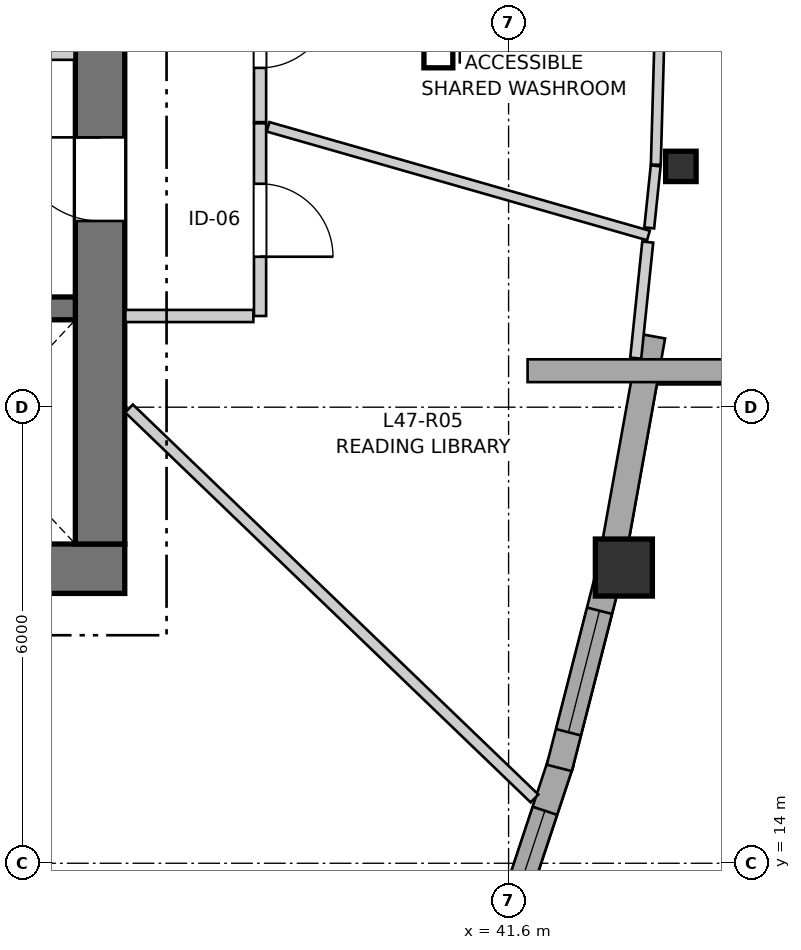
"""IFC4 building model, lengths in metres.
Left out: names, types, materials, properties, quantities, classifications, styles, units other than length and angle.
Written with IfcOpenShell. Run it as: python <this file> out.ifc"""

import sys

from ifc_helpers import new_model, si_unit, direction, frame, frame_2d, origin, origin_2d, place, context, subcontext, project, spatial, rectangle, i_section, extrude, source, transform, mapped, element, fill, save


model = new_model("IFC4")
c1 = context("Model", 3, precision=1e-05, world=origin(), true_north=direction((0.0, 1.0)))
c2 = subcontext(c1, "Body", "Model", "MODEL_VIEW")
j1 = project(units=[si_unit("LENGTHUNIT", "METRE"), si_unit("PLANEANGLEUNIT", "RADIAN")], contexts=[c1])
p1 = place(None, origin())
s1 = spatial("IfcSite", under=j1, at=p1, CompositionType="ELEMENT")
p2 = place(p1, origin())
s2 = spatial("IfcBuilding", under=s1, at=p2, CompositionType="ELEMENT")
p3 = place(p2, frame((0.0, 0.0, 158.6)))
s3 = spatial("IfcBuildingStorey", under=s2, at=p3, CompositionType="ELEMENT", Elevation=158.6)
p4 = place(p3, frame((24.15, 17.875, 0.0), z_axis=(0.0, 0.0, 1.0), x_axis=(1.0, 0.0, 0.0)))
e1 = element("IfcWall", 1, at=p4, inside=s3, PredefinedType="SHEAR", context=c2, shape_type="SweptSolid", body=[
    extrude(rectangle(XDim=12.4, YDim=0.65, at=frame_2d((6.2, 0.0))), origin(), (0.0, 0.0, 1.0), 2.95),
])
p5 = place(p3, frame((36.225, 18.2, 0.0), z_axis=(0.0, 0.0, 1.0), x_axis=(0.0, 1.0, 0.0)))
e2 = element("IfcWall", 2, at=p5, inside=s3, PredefinedType="SHEAR", context=c2, shape_type="SweptSolid", body=[
    extrude(rectangle(XDim=15.6, YDim=0.65, at=frame_2d((7.8, 0.0))), origin(), (0.0, 0.0, 1.0), 2.95),
])
p6 = place(p5, frame((4.25, 0.0, 0.0)))
e3 = element("IfcOpeningElement", 3, at=p6, cuts=e2, PredefinedType="OPENING", context=c2, shape_type="SweptSolid", body=[
    extrude(rectangle(XDim=1.1, YDim=2.15, at=frame_2d((0.55, 1.075))), frame((0.0, 0.335, 0.0), z_axis=(0.0, -1.0, 0.0), x_axis=(1.0, 0.0, 0.0)), (0.0, 0.0, 1.0), 0.67),
])
p7 = place(p5, frame((10.25, 0.0, 0.0)))
e4 = element("IfcOpeningElement", 4, at=p7, cuts=e2, PredefinedType="OPENING", context=c2, shape_type="SweptSolid", body=[
    extrude(rectangle(XDim=1.1, YDim=2.15, at=frame_2d((0.55, 1.075))), frame((0.0, 0.335, 0.0), z_axis=(0.0, -1.0, 0.0), x_axis=(1.0, 0.0, 0.0)), (0.0, 0.0, 1.0), 0.67),
])
p8 = place(p3, frame((24.8, 21.3, 0.0), z_axis=(0.0, 0.0, 1.0), x_axis=(1.0, 0.0, 0.0)))
e5 = element("IfcWall", 5, at=p8, inside=s3, PredefinedType="SHEAR", context=c2, shape_type="SweptSolid", body=[
    extrude(rectangle(XDim=11.1, YDim=0.3, at=frame_2d((5.55, 0.0))), origin(), (0.0, 0.0, 1.0), 2.95),
])
p9 = place(p8, frame((6.22, 0.0, 0.0)))
e6 = element("IfcOpeningElement", 6, at=p9, cuts=e5, PredefinedType="OPENING", context=c2, shape_type="SweptSolid", body=[
    extrude(rectangle(XDim=0.98, YDim=2.15, at=frame_2d((0.49, 1.075))), frame((0.0, 0.16, 0.0), z_axis=(0.0, -1.0, 0.0), x_axis=(1.0, 0.0, 0.0)), (0.0, 0.0, 1.0), 0.32),
])
p10 = place(p8, frame((9.15, 0.0, 0.0)))
e7 = element("IfcOpeningElement", 7, at=p10, cuts=e5, PredefinedType="OPENING", context=c2, shape_type="SweptSolid", body=[
    extrude(rectangle(XDim=1.15, YDim=2.15, at=frame_2d((0.575, 1.075))), frame((0.0, 0.16, 0.0), z_axis=(0.0, -1.0, 0.0), x_axis=(1.0, 0.0, 0.0)), (0.0, 0.0, 1.0), 0.32),
])
m1 = source(origin(), c2, "Body", "SweptSolid", [
    extrude(rectangle(XDim=0.75, YDim=0.75, at=origin_2d()), origin(), (0.0, 0.0, 1.0), 2.95),
])
p11 = place(p3, frame((43.117, 17.89, 0.0), z_axis=(0.0, 0.0, 1.0), x_axis=(1.0, 0.0, 0.0)))
e8 = element("IfcColumn", 8, at=p11, inside=s3, PredefinedType="COLUMN", context=c2, shape_type="MappedRepresentation", body=[
    mapped(m1, transform((0.0, 0.0, 0.0), x_axis=(1.0, 0.0, 0.0), y_axis=(0.0, 1.0, 0.0), z_axis=(0.0, 0.0, 1.0), scale=1.0)),
])
m2 = source(origin(), c2, "Body", "SweptSolid", [
    extrude(i_section(OverallWidth=0.401, OverallDepth=0.399, WebThickness=0.023, FlangeThickness=0.036, FilletRadius=0.015, at=origin_2d()), origin(), (0.0, 0.0, 1.0), 2.95),
])
p12 = place(p3, frame((43.867, 23.168, 0.0), z_axis=(0.0, 0.0, 1.0), x_axis=(1.0, 0.0, 0.0)))
e9 = element("IfcColumn", 9, at=p12, inside=s3, PredefinedType="PILASTER", context=c2, shape_type="MappedRepresentation", body=[
    mapped(m2, transform((0.0, 0.0, 0.0), x_axis=(1.0, 0.0, 0.0), y_axis=(0.0, 1.0, 0.0), z_axis=(0.0, 0.0, 1.0), scale=1.0)),
])
p13 = place(p3, frame((41.411, 12.677, 0.0), z_axis=(0.0, 0.0, 1.0), x_axis=(0.31445026244, 0.949273950159, 0.0)))
e10 = element("IfcWall", 10, at=p13, inside=s3, PredefinedType="SOLIDWALL", context=c2, shape_type="SweptSolid", body=[
    extrude(rectangle(XDim=2.803, YDim=0.34, at=frame_2d((1.401, 0.0))), origin(), (0.0, 0.0, 1.0), 2.53),
])
p14 = place(p13, frame((0.321, 0.0, 0.82)))
e11 = element("IfcOpeningElement", 11, at=p14, cuts=e10, PredefinedType="OPENING", context=c2, shape_type="SweptSolid", body=[
    extrude(rectangle(XDim=1.8, YDim=1.45, at=frame_2d((0.9, 0.725))), frame((0.0, 0.18, 0.0), z_axis=(0.0, -1.0, 0.0), x_axis=(1.0, 0.0, 0.0)), (0.0, 0.0, 1.0), 0.36),
])
p15 = place(p3, frame((42.267, 15.254, 0.0), z_axis=(0.0, 0.0, 1.0), x_axis=(0.247727064013, 0.96882986213, 0.0)))
e12 = element("IfcWall", 12, at=p15, inside=s3, PredefinedType="SOLIDWALL", context=c2, shape_type="SweptSolid", body=[
    extrude(rectangle(XDim=2.61, YDim=0.34, at=frame_2d((1.305, 0.0))), origin(), (0.0, 0.0, 1.0), 2.53),
])
p16 = place(p15, frame((0.485, 0.0, 0.82)))
e13 = element("IfcOpeningElement", 13, at=p16, cuts=e12, PredefinedType="OPENING", context=c2, shape_type="SweptSolid", body=[
    extrude(rectangle(XDim=1.65, YDim=1.45, at=frame_2d((0.825, 0.725))), frame((0.0, 0.18, 0.0), z_axis=(0.0, -1.0, 0.0), x_axis=(1.0, 0.0, 0.0)), (0.0, 0.0, 1.0), 0.36),
])
p17 = place(p3, frame((42.977, 18.073, 0.0), z_axis=(0.0, 0.0, 1.0), x_axis=(0.177185533742, 0.984177467042, 0.0)))
e14 = element("IfcWall", 14, at=p17, inside=s3, PredefinedType="SOLIDWALL", context=c2, shape_type="SweptSolid", body=[
    extrude(rectangle(XDim=2.907, YDim=0.34, at=frame_2d((1.454, 0.0))), origin(), (0.0, 0.0, 1.0), 2.53),
])
p18 = place(p3, frame((41.85, 20.48, 0.0), z_axis=(0.0, 0.0, 1.0), x_axis=(1.0, 0.0, 0.0)))
e15 = element("IfcWall", 15, at=p18, inside=s3, PredefinedType="SOLIDWALL", context=c2, shape_type="SweptSolid", body=[
    extrude(rectangle(XDim=17.423, YDim=0.3, at=frame_2d((8.711, 0.0))), origin(), (0.0, 0.0, 1.0), 2.13),
])
p19 = place(p3, frame((30.67, 24.66, 0.0), z_axis=(0.0, 0.0, 1.0), x_axis=(1.0, 0.0, 0.0)))
e16 = element("IfcWall", 16, at=p19, inside=s3, PredefinedType="PARTITIONING", context=c2, shape_type="SweptSolid", body=[
    extrude(rectangle(XDim=5.22, YDim=0.18, at=frame_2d((2.61, 0.0))), origin(), (0.0, 0.0, 1.0), 2.95),
])
p20 = place(p19, frame((0.68, 0.0, 0.0)))
e17 = element("IfcOpeningElement", 17, at=p20, cuts=e16, PredefinedType="OPENING", context=c2, shape_type="SweptSolid", body=[
    extrude(rectangle(XDim=0.98, YDim=2.15, at=frame_2d((0.49, 1.075))), frame((0.0, 0.1, 0.0), z_axis=(0.0, -1.0, 0.0), x_axis=(1.0, 0.0, 0.0)), (0.0, 0.0, 1.0), 0.2),
])
p21 = place(p3, frame((38.33, 23.735, 0.0), z_axis=(0.0, 0.0, 1.0), x_axis=(0.0, -1.0, 0.0)))
e18 = element("IfcWall", 18, at=p21, inside=s3, PredefinedType="PARTITIONING", context=c2, shape_type="SweptSolid", body=[
    extrude(rectangle(XDim=2.535, YDim=0.16, at=frame_2d((1.268, 0.0))), origin(), (0.0, 0.0, 1.0), 2.95),
])
p22 = place(p21, frame((0.795, 0.0, 0.0)))
e19 = element("IfcOpeningElement", 19, at=p22, cuts=e18, PredefinedType="OPENING", context=c2, shape_type="SweptSolid", body=[
    extrude(rectangle(XDim=0.96, YDim=2.1, at=frame_2d((0.48, 1.05))), frame((0.0, 0.09, 0.0), z_axis=(0.0, -1.0, 0.0), x_axis=(1.0, 0.0, 0.0)), (0.0, 0.0, 1.0), 0.18),
])
p23 = place(p3, frame((38.33, 26.129, 0.0), z_axis=(0.0, 0.0, 1.0), x_axis=(0.0, -1.0, 0.0)))
e20 = element("IfcWall", 20, at=p23, inside=s3, PredefinedType="PARTITIONING", context=c2, shape_type="SweptSolid", body=[
    extrude(rectangle(XDim=2.379, YDim=0.16, at=frame_2d((1.189, 0.0))), origin(), (0.0, 0.0, 1.0), 2.95),
])
p24 = place(p23, frame((0.715, 0.0, 0.0)))
e21 = element("IfcOpeningElement", 21, at=p24, cuts=e20, PredefinedType="OPENING", context=c2, shape_type="SweptSolid", body=[
    extrude(rectangle(XDim=0.95, YDim=2.1, at=frame_2d((0.475, 1.05))), frame((0.0, 0.09, 0.0), z_axis=(0.0, -1.0, 0.0), x_axis=(1.0, 0.0, 0.0)), (0.0, 0.0, 1.0), 0.18),
])
p25 = place(p3, frame((36.606, 19.983, 0.0), z_axis=(0.0, 0.0, 1.0), x_axis=(0.720776649136, -0.69316738387, 0.0)))
e22 = element("IfcWall", 22, at=p25, inside=s3, PredefinedType="PARTITIONING", context=c2, shape_type="SweptSolid", body=[
    extrude(rectangle(XDim=7.401, YDim=0.145, at=frame_2d((3.701, 0.0))), origin(), (0.0, 0.0, 1.0), 2.95),
])
p26 = place(p3, frame((38.436, 23.689, 0.0), z_axis=(0.0, 0.0, 1.0), x_axis=(0.961531027854, -0.274696345942, 0.0)))
e23 = element("IfcWall", 23, at=p26, inside=s3, PredefinedType="PARTITIONING", context=c2, shape_type="SweptSolid", body=[
    extrude(rectangle(XDim=5.205, YDim=0.13, at=frame_2d((2.602, 0.0))), origin(), (0.0, 0.0, 1.0), 2.95),
])
p27 = place(p3, frame((43.537, 23.19, 0.0), z_axis=(0.0, 0.0, 1.0), x_axis=(0.028319632762, 0.999598918767, 0.0)))
e24 = element("IfcWall", 24, at=p27, inside=s3, PredefinedType="PARTITIONING", context=c2, shape_type="SweptSolid", body=[
    extrude(rectangle(XDim=2.612, YDim=0.13, at=frame_2d((1.306, 0.0))), origin(), (0.0, 0.0, 1.0), 2.518),
])
p28 = place(p3, frame((36.558, 21.2, 0.0), z_axis=(0.0, 0.0, 1.0), x_axis=(1.0, 0.0, 0.0)))
e25 = element("IfcWall", 25, at=p28, inside=s3, PredefinedType="PARTITIONING", context=c2, shape_type="SweptSolid", body=[
    extrude(rectangle(XDim=1.684, YDim=0.16, at=frame_2d((0.842, 0.0))), origin(), (0.0, 0.0, 1.0), 2.95),
])
p29 = place(p3, frame((43.273, 20.646, 0.0), z_axis=(0.0, 0.0, 1.0), x_axis=(0.103045636414, 0.99467662927, 0.0)))
e26 = element("IfcWall", 26, at=p29, inside=s3, PredefinedType="PARTITIONING", context=c2, shape_type="SweptSolid", body=[
    extrude(rectangle(XDim=1.535, YDim=0.145, at=frame_2d((0.768, 0.0))), origin(), (0.0, 0.0, 1.0), 2.518),
])
p30 = place(p3, frame((43.45, 22.359, 0.0), z_axis=(0.0, 0.0, 1.0), x_axis=(0.103538633142, 0.994625432737, 0.0)))
e27 = element("IfcWall", 27, at=p30, inside=s3, PredefinedType="PARTITIONING", context=c2, shape_type="SweptSolid", body=[
    extrude(rectangle(XDim=0.821, YDim=0.13, at=frame_2d((0.41, 0.0))), origin(), (0.0, 0.0, 1.0), 2.518),
])
m3 = source(origin(), c2, "Body", "SweptSolid", [
    extrude(rectangle(XDim=1.8, YDim=1.45, at=frame_2d((0.9, 0.725))), frame((0.0, 0.03, 0.0), z_axis=(0.0, -1.0, 0.0), x_axis=(1.0, 0.0, 0.0)), (0.0, 0.0, 1.0), 0.06),
])
p31 = place(p14, origin())
e28 = element("IfcWindow", 28, at=p31, inside=s3, PartitioningType="SINGLE_PANEL", PredefinedType="WINDOW", context=c2, shape_type="MappedRepresentation", body=[
    mapped(m3, transform((0.0, 0.0, 0.0), x_axis=(1.0, 0.0, 0.0), y_axis=(0.0, 1.0, 0.0), z_axis=(0.0, 0.0, 1.0), scale=1.0)),
])
fill(e11, e28)
m4 = source(origin(), c2, "Body", "SweptSolid", [
    extrude(rectangle(XDim=1.65, YDim=1.45, at=frame_2d((0.825, 0.725))), frame((0.0, 0.03, 0.0), z_axis=(0.0, -1.0, 0.0), x_axis=(1.0, 0.0, 0.0)), (0.0, 0.0, 1.0), 0.06),
])
p32 = place(p16, origin())
e29 = element("IfcWindow", 29, at=p32, inside=s3, PartitioningType="SINGLE_PANEL", PredefinedType="WINDOW", context=c2, shape_type="MappedRepresentation", body=[
    mapped(m4, transform((0.0, 0.0, 0.0), x_axis=(1.0, 0.0, 0.0), y_axis=(0.0, 1.0, 0.0), z_axis=(0.0, 0.0, 1.0), scale=1.0)),
])
fill(e13, e29)
m5 = source(origin(), c2, "Body", "SweptSolid", [
    extrude(rectangle(XDim=1.1, YDim=2.15, at=frame_2d((0.55, 1.075))), frame((0.0, 0.025, 0.0), z_axis=(0.0, -1.0, 0.0), x_axis=(1.0, 0.0, 0.0)), (0.0, 0.0, 1.0), 0.05),
])
p33 = place(p6, origin())
e30 = element("IfcDoor", 30, at=p33, inside=s3, OperationType="SINGLE_SWING_RIGHT", PredefinedType="DOOR", context=c2, shape_type="MappedRepresentation", body=[
    mapped(m5, transform((0.0, 0.0, 0.0), x_axis=(1.0, 0.0, 0.0), y_axis=(0.0, 1.0, 0.0), z_axis=(0.0, 0.0, 1.0), scale=1.0)),
])
fill(e3, e30)
m6 = source(origin(), c2, "Body", "SweptSolid", [
    extrude(rectangle(XDim=0.96, YDim=2.1, at=frame_2d((0.48, 1.05))), frame((0.0, 0.025, 0.0), z_axis=(0.0, -1.0, 0.0), x_axis=(1.0, 0.0, 0.0)), (0.0, 0.0, 1.0), 0.05),
])
p34 = place(p22, origin())
e31 = element("IfcDoor", 31, at=p34, inside=s3, OperationType="SINGLE_SWING_RIGHT", PredefinedType="DOOR", context=c2, shape_type="MappedRepresentation", body=[
    mapped(m6, transform((0.0, 0.0, 0.0), x_axis=(1.0, 0.0, 0.0), y_axis=(0.0, 1.0, 0.0), z_axis=(0.0, 0.0, 1.0), scale=1.0)),
])
fill(e19, e31)
m7 = source(origin(), c2, "Body", "SweptSolid", [
    extrude(rectangle(XDim=0.95, YDim=2.1, at=frame_2d((0.475, 1.05))), frame((0.0, 0.025, 0.0), z_axis=(0.0, -1.0, 0.0), x_axis=(1.0, 0.0, 0.0)), (0.0, 0.0, 1.0), 0.05),
])
p35 = place(p24, origin())
e32 = element("IfcDoor", 32, at=p35, inside=s3, OperationType="SINGLE_SWING_LEFT", PredefinedType="DOOR", context=c2, shape_type="MappedRepresentation", body=[
    mapped(m7, transform((0.0, 0.0, 0.0), x_axis=(1.0, 0.0, 0.0), y_axis=(0.0, 1.0, 0.0), z_axis=(0.0, 0.0, 1.0), scale=1.0)),
])
fill(e21, e32)
save(model, sys.argv[1])
